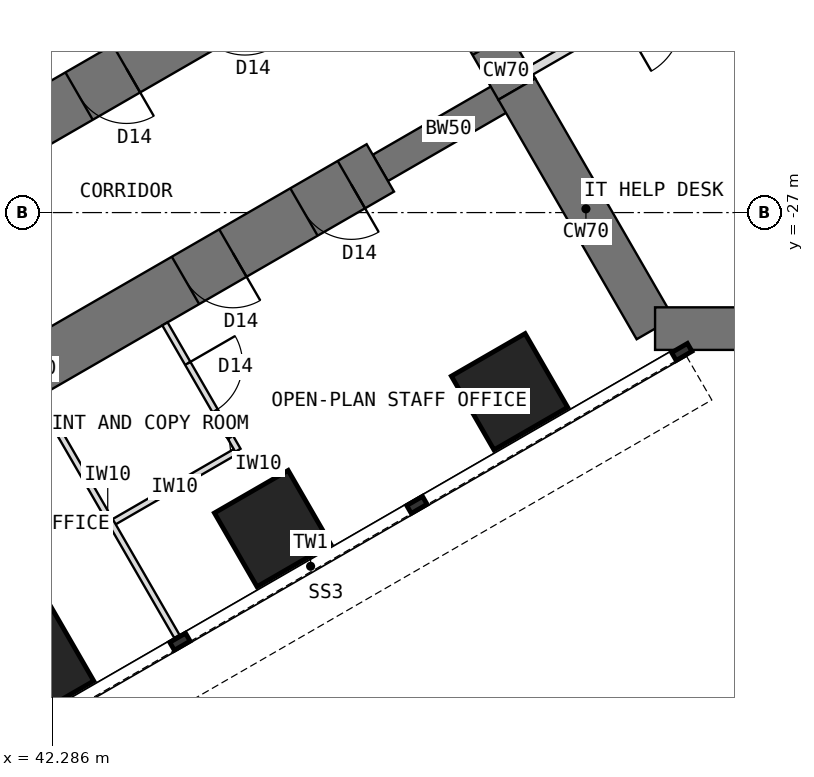
"""IFC4 building model, lengths in metres.
Left out: names, types, materials, properties, quantities, classifications, styles, units other than length and angle.
Written with IfcOpenShell. Run it as: python <this file> out.ifc"""

import sys

from ifc_helpers import new_model, si_unit, direction, frame, frame_2d, origin, origin_2d, place, context, subcontext, project, spatial, rectangle, extrude, element, fill, save


model = new_model("IFC4")
c1 = context("Model", 3, precision=1e-05, world=origin(), true_north=direction((0.0, 1.0)))
c2 = subcontext(c1, "Body", "Model", "MODEL_VIEW")
j1 = project(units=[si_unit("LENGTHUNIT", "METRE"), si_unit("PLANEANGLEUNIT", "RADIAN")], contexts=[c1])
p1 = place(None, origin())
s1 = spatial("IfcSite", under=j1, at=p1, CompositionType="ELEMENT")
p2 = place(p1, origin())
s2 = spatial("IfcBuilding", under=s1, at=p2, CompositionType="ELEMENT")
p3 = place(p2, frame((0.0, 0.0, 80.5)))
s3 = spatial("IfcBuildingStorey", under=s2, at=p3, CompositionType="ELEMENT", Elevation=80.5)
p4 = place(p3, frame((48.178, -21.939, 0.0), z_axis=(0.0, 0.0, 1.0), x_axis=(0.500010275428, -0.866019471182, 0.0)))
e1 = element("IfcWall", 1, at=p4, inside=s3, PredefinedType="SHEAR", context=c2, shape_type="SweptSolid", body=[
    extrude(rectangle(XDim=3.5, YDim=0.7, at=frame_2d((1.75, 0.0))), origin(), (0.0, 0.0, 1.0), 4.0),
])
p5 = place(p4, frame((0.85, 0.0, 0.0)))
e2 = element("IfcOpeningElement", 2, at=p5, cuts=e1, PredefinedType="OPENING", context=c2, shape_type="SweptSolid", body=[
    extrude(rectangle(XDim=1.8, YDim=2.1, at=frame_2d((0.9, 1.05))), frame((0.0, 0.36, 0.0), z_axis=(0.0, -1.0, 0.0), x_axis=(1.0, 0.0, 0.0)), (0.0, 0.0, 1.0), 0.72),
])
p6 = place(p3, frame((49.928, -24.97, 0.0), z_axis=(0.0, 0.0, 1.0), x_axis=(0.499984222037, -0.866034513004, 0.0)))
e3 = element("IfcWall", 3, at=p6, inside=s3, PredefinedType="SHEAR", context=c2, shape_type="SweptSolid", body=[
    extrude(rectangle(XDim=4.548, YDim=0.7, at=frame_2d((2.274, 0.0))), origin(), (0.0, 0.0, 1.0), 4.0),
])
p7 = place(p3, frame((52.202, -28.908, 0.0), z_axis=(0.0, 0.0, 1.0), x_axis=(1.0, 0.0, 0.0)))
e4 = element("IfcWall", 4, at=p7, inside=s3, PredefinedType="SHEAR", context=c2, shape_type="SweptSolid", body=[
    extrude(rectangle(XDim=12.596, YDim=0.7, at=frame_2d((6.298, 0.0))), origin(), (0.0, 0.0, 1.0), 4.0),
])
p8 = place(p3, frame((49.928, -24.97, 0.0), z_axis=(0.0, 0.0, 1.0), x_axis=(-0.866031863473, -0.499988811324, 0.0)))
e5 = element("IfcWall", 5, at=p8, inside=s3, PredefinedType="SHEAR", context=c2, shape_type="SweptSolid", body=[
    extrude(rectangle(XDim=2.592, YDim=0.5, at=frame_2d((1.296, 0.0))), origin(), (0.0, 0.0, 1.0), 4.0),
])
p9 = place(p3, frame((47.684, -26.266, 0.0), z_axis=(0.0, 0.0, 1.0), x_axis=(-0.866027579429, -0.499996231654, 0.0)))
e6 = element("IfcWall", 6, at=p9, inside=s3, PredefinedType="SHEAR", context=c2, shape_type="SweptSolid", body=[
    extrude(rectangle(XDim=13.2, YDim=0.9, at=frame_2d((6.6, 0.0))), origin(), (0.0, 0.0, 1.0), 4.0),
])
p10 = place(p9, frame((0.55, 0.0, 0.0)))
e7 = element("IfcOpeningElement", 7, at=p10, cuts=e6, PredefinedType="OPENING", context=c2, shape_type="SweptSolid", body=[
    extrude(rectangle(XDim=0.9, YDim=2.1, at=frame_2d((0.45, 1.05))), frame((0.0, 0.46, 0.0), z_axis=(0.0, -1.0, 0.0), x_axis=(1.0, 0.0, 0.0)), (0.0, 0.0, 1.0), 0.92),
])
p11 = place(p9, frame((2.8, 0.0, 0.0)))
e8 = element("IfcOpeningElement", 8, at=p11, cuts=e6, PredefinedType="OPENING", context=c2, shape_type="SweptSolid", body=[
    extrude(rectangle(XDim=0.9, YDim=2.1, at=frame_2d((0.45, 1.05))), frame((0.0, 0.46, 0.0), z_axis=(0.0, -1.0, 0.0), x_axis=(1.0, 0.0, 0.0)), (0.0, 0.0, 1.0), 0.92),
])
p12 = place(p9, frame((7.3, 0.0, 0.0)))
e9 = element("IfcOpeningElement", 9, at=p12, cuts=e6, PredefinedType="OPENING", context=c2, shape_type="SweptSolid", body=[
    extrude(rectangle(XDim=0.9, YDim=2.1, at=frame_2d((0.45, 1.05))), frame((0.0, 0.46, 0.0), z_axis=(0.0, -1.0, 0.0), x_axis=(1.0, 0.0, 0.0)), (0.0, 0.0, 1.0), 0.92),
])
p13 = place(p3, frame((45.934, -23.234, 0.0), z_axis=(0.0, 0.0, 1.0), x_axis=(-0.866019570528, -0.500010103361, 0.0)))
e10 = element("IfcWall", 10, at=p13, inside=s3, PredefinedType="SHEAR", context=c2, shape_type="SweptSolid", body=[
    extrude(rectangle(XDim=13.2, YDim=0.9, at=frame_2d((6.6, 0.0))), origin(), (0.0, 0.0, 1.0), 4.0),
])
p14 = place(p13, frame((0.55, 0.0, 0.0)))
e11 = element("IfcOpeningElement", 11, at=p14, cuts=e10, PredefinedType="OPENING", context=c2, shape_type="SweptSolid", body=[
    extrude(rectangle(XDim=0.9, YDim=2.1, at=frame_2d((0.45, 1.05))), frame((0.0, 0.46, 0.0), z_axis=(0.0, -1.0, 0.0), x_axis=(1.0, 0.0, 0.0)), (0.0, 0.0, 1.0), 0.92),
])
p15 = place(p13, frame((2.8, 0.0, 0.0)))
e12 = element("IfcOpeningElement", 12, at=p15, cuts=e10, PredefinedType="OPENING", context=c2, shape_type="SweptSolid", body=[
    extrude(rectangle(XDim=0.9, YDim=2.1, at=frame_2d((0.45, 1.05))), frame((0.0, 0.46, 0.0), z_axis=(0.0, -1.0, 0.0), x_axis=(1.0, 0.0, 0.0)), (0.0, 0.0, 1.0), 0.92),
])
p16 = place(p13, frame((7.3, 0.0, 0.0)))
e13 = element("IfcOpeningElement", 13, at=p16, cuts=e10, PredefinedType="OPENING", context=c2, shape_type="SweptSolid", body=[
    extrude(rectangle(XDim=0.9, YDim=2.1, at=frame_2d((0.45, 1.05))), frame((0.0, 0.46, 0.0), z_axis=(0.0, -1.0, 0.0), x_axis=(1.0, 0.0, 0.0)), (0.0, 0.0, 1.0), 0.92),
])
for number, where, z_axis, x_axis in (
    (14, (49.809, -29.946, 0.0), (0.0, 0.0, 1.0), (0.866, 0.5, 0.0)),
    (15, (45.912, -32.196, 0.0), (0.0, 0.0, 1.0), (0.866, 0.5, 0.0)),
    (16, (42.014, -34.446, 0.0), (0.0, 0.0, 1.0), (0.866, 0.5, 0.0)),
):
    element("IfcColumn", number, at=place(p3, frame(where, z_axis=z_axis, x_axis=x_axis)), inside=s3, PredefinedType="COLUMN", context=c2, shape_type="SweptSolid", body=[
        extrude(rectangle(XDim=1.4, YDim=1.4, at=origin_2d()), origin(), (0.0, 0.0, 1.0), 4.0),
    ])
p17 = place(p3, frame((42.063, -30.03, 0.0), z_axis=(0.0, 0.0, 1.0), x_axis=(0.499982560684, -0.866035472144, 0.0)))
e17 = element("IfcWall", 17, at=p17, inside=s3, PredefinedType="PARTITIONING", context=c2, shape_type="SweptSolid", body=[
    extrude(rectangle(XDim=4.55, YDim=0.1, at=frame_2d((2.275, 0.0))), origin(), (0.0, 0.0, 1.0), 3.8),
])
p18 = place(p3, frame((45.342, -30.909, 0.0), z_axis=(0.0, 0.0, 1.0), x_axis=(-0.866050077142, -0.499957262057, 0.0)))
e18 = element("IfcWall", 18, at=p18, inside=s3, PredefinedType="PARTITIONING", context=c2, shape_type="SweptSolid", body=[
    extrude(rectangle(XDim=2.4, YDim=0.1, at=frame_2d((1.2, 0.0))), origin(), (0.0, 0.0, 1.0), 3.8),
])
p19 = place(p3, frame((44.141, -28.83, 0.0), z_axis=(0.0, 0.0, 1.0), x_axis=(0.500077600433, -0.865980596518, 0.0)))
e19 = element("IfcWall", 19, at=p19, inside=s3, PredefinedType="PARTITIONING", context=c2, shape_type="SweptSolid", body=[
    extrude(rectangle(XDim=2.4, YDim=0.1, at=frame_2d((1.2, 0.0))), origin(), (0.0, 0.0, 1.0), 3.8),
])
p20 = place(p19, frame((0.75, 0.0, 0.0)))
e20 = element("IfcOpeningElement", 20, at=p20, cuts=e19, PredefinedType="OPENING", context=c2, shape_type="SweptSolid", body=[
    extrude(rectangle(XDim=0.9, YDim=2.1, at=frame_2d((0.45, 1.05))), frame((0.0, 0.06, 0.0), z_axis=(0.0, -1.0, 0.0), x_axis=(1.0, 0.0, 0.0)), (0.0, 0.0, 1.0), 0.12),
])
p21 = place(p3, frame((54.017, -22.436, 0.0), z_axis=(0.0, 0.0, 1.0), x_axis=(-0.866015446554, -0.500017246033, 0.0)))
e21 = element("IfcWall", 21, at=p21, inside=s3, PredefinedType="PARTITIONING", context=c2, shape_type="SweptSolid", body=[
    extrude(rectangle(XDim=4.469, YDim=0.15, at=frame_2d((2.234, 0.0))), origin(), (0.0, 0.0, 1.0), 3.8),
])
p22 = place(p21, frame((1.744, 0.0, 0.0)))
e22 = element("IfcOpeningElement", 22, at=p22, cuts=e21, PredefinedType="OPENING", context=c2, shape_type="SweptSolid", body=[
    extrude(rectangle(XDim=1.0, YDim=2.1, at=frame_2d((0.5, 1.05))), frame((0.0, 0.085, 0.0), z_axis=(0.0, -1.0, 0.0), x_axis=(1.0, 0.0, 0.0)), (0.0, 0.0, 1.0), 0.17),
])
p23 = place(p5, origin())
e23 = element("IfcDoor", 23, at=p23, inside=s3, OperationType="DOUBLE_DOOR_DOUBLE_SWING", PredefinedType="DOOR", context=c2, shape_type="SweptSolid", body=[
    extrude(rectangle(XDim=1.72, YDim=2.06, at=frame_2d((0.9, 1.03))), frame((0.0, 0.025, 0.0), z_axis=(0.0, -1.0, 0.0), x_axis=(1.0, 0.0, 0.0)), (0.0, 0.0, 1.0), 0.05),
    extrude(rectangle(XDim=0.04, YDim=2.1, at=frame_2d((0.02, 1.05))), frame((0.0, 0.35, 0.0), z_axis=(0.0, -1.0, 0.0), x_axis=(1.0, 0.0, 0.0)), (0.0, 0.0, 1.0), 0.699),
    extrude(rectangle(XDim=0.04, YDim=2.1, at=frame_2d((1.78, 1.05))), frame((0.0, 0.35, 0.0), z_axis=(0.0, -1.0, 0.0), x_axis=(1.0, 0.0, 0.0)), (0.0, 0.0, 1.0), 0.699),
    extrude(rectangle(XDim=1.72, YDim=0.04, at=frame_2d((0.9, 2.08))), frame((0.0, 0.35, 0.0), z_axis=(0.0, -1.0, 0.0), x_axis=(1.0, 0.0, 0.0)), (0.0, 0.0, 1.0), 0.699),
])
fill(e2, e23)
p24 = place(p20, origin())
e24 = element("IfcDoor", 24, at=p24, inside=s3, OperationType="SINGLE_SWING_LEFT", PredefinedType="DOOR", context=c2, shape_type="SweptSolid", body=[
    extrude(rectangle(XDim=0.9, YDim=2.1, at=frame_2d((0.45, 1.05))), frame((0.0, 0.025, 0.0), z_axis=(0.0, -1.0, 0.0), x_axis=(1.0, 0.0, 0.0)), (0.0, 0.0, 1.0), 0.05),
])
fill(e20, e24)
p25 = place(p10, origin())
e25 = element("IfcDoor", 25, at=p25, inside=s3, OperationType="SINGLE_SWING_LEFT", PredefinedType="DOOR", context=c2, shape_type="SweptSolid", body=[
    extrude(rectangle(XDim=0.82, YDim=2.06, at=frame_2d((0.45, 1.03))), frame((0.0, 0.025, 0.0), z_axis=(0.0, -1.0, 0.0), x_axis=(1.0, 0.0, 0.0)), (0.0, 0.0, 1.0), 0.05),
    extrude(rectangle(XDim=0.04, YDim=2.1, at=frame_2d((0.02, 1.05))), frame((0.0, 0.45, 0.0), z_axis=(0.0, -1.0, 0.0), x_axis=(1.0, 0.0, 0.0)), (0.0, 0.0, 1.0), 0.899),
    extrude(rectangle(XDim=0.04, YDim=2.1, at=frame_2d((0.88, 1.05))), frame((0.0, 0.45, 0.0), z_axis=(0.0, -1.0, 0.0), x_axis=(1.0, 0.0, 0.0)), (0.0, 0.0, 1.0), 0.899),
    extrude(rectangle(XDim=0.82, YDim=0.04, at=frame_2d((0.45, 2.08))), frame((0.0, 0.45, 0.0), z_axis=(0.0, -1.0, 0.0), x_axis=(1.0, 0.0, 0.0)), (0.0, 0.0, 1.0), 0.899),
])
fill(e7, e25)
p26 = place(p11, origin())
e26 = element("IfcDoor", 26, at=p26, inside=s3, OperationType="SINGLE_SWING_LEFT", PredefinedType="DOOR", context=c2, shape_type="SweptSolid", body=[
    extrude(rectangle(XDim=0.82, YDim=2.06, at=frame_2d((0.45, 1.03))), frame((0.0, 0.025, 0.0), z_axis=(0.0, -1.0, 0.0), x_axis=(1.0, 0.0, 0.0)), (0.0, 0.0, 1.0), 0.05),
    extrude(rectangle(XDim=0.04, YDim=2.1, at=frame_2d((0.02, 1.05))), frame((0.0, 0.45, 0.0), z_axis=(0.0, -1.0, 0.0), x_axis=(1.0, 0.0, 0.0)), (0.0, 0.0, 1.0), 0.899),
    extrude(rectangle(XDim=0.04, YDim=2.1, at=frame_2d((0.88, 1.05))), frame((0.0, 0.45, 0.0), z_axis=(0.0, -1.0, 0.0), x_axis=(1.0, 0.0, 0.0)), (0.0, 0.0, 1.0), 0.899),
    extrude(rectangle(XDim=0.82, YDim=0.04, at=frame_2d((0.45, 2.08))), frame((0.0, 0.45, 0.0), z_axis=(0.0, -1.0, 0.0), x_axis=(1.0, 0.0, 0.0)), (0.0, 0.0, 1.0), 0.899),
])
fill(e8, e26)
p27 = place(p15, origin())
e27 = element("IfcDoor", 27, at=p27, inside=s3, OperationType="SINGLE_SWING_LEFT", PredefinedType="DOOR", context=c2, shape_type="SweptSolid", body=[
    extrude(rectangle(XDim=0.82, YDim=2.06, at=frame_2d((0.45, 1.03))), frame((0.0, 0.025, 0.0), z_axis=(0.0, -1.0, 0.0), x_axis=(1.0, 0.0, 0.0)), (0.0, 0.0, 1.0), 0.05),
    extrude(rectangle(XDim=0.04, YDim=2.1, at=frame_2d((0.02, 1.05))), frame((0.0, 0.45, 0.0), z_axis=(0.0, -1.0, 0.0), x_axis=(1.0, 0.0, 0.0)), (0.0, 0.0, 1.0), 0.899),
    extrude(rectangle(XDim=0.04, YDim=2.1, at=frame_2d((0.88, 1.05))), frame((0.0, 0.45, 0.0), z_axis=(0.0, -1.0, 0.0), x_axis=(1.0, 0.0, 0.0)), (0.0, 0.0, 1.0), 0.899),
    extrude(rectangle(XDim=0.82, YDim=0.04, at=frame_2d((0.45, 2.08))), frame((0.0, 0.45, 0.0), z_axis=(0.0, -1.0, 0.0), x_axis=(1.0, 0.0, 0.0)), (0.0, 0.0, 1.0), 0.899),
])
fill(e12, e27)
save(model, sys.argv[1])
